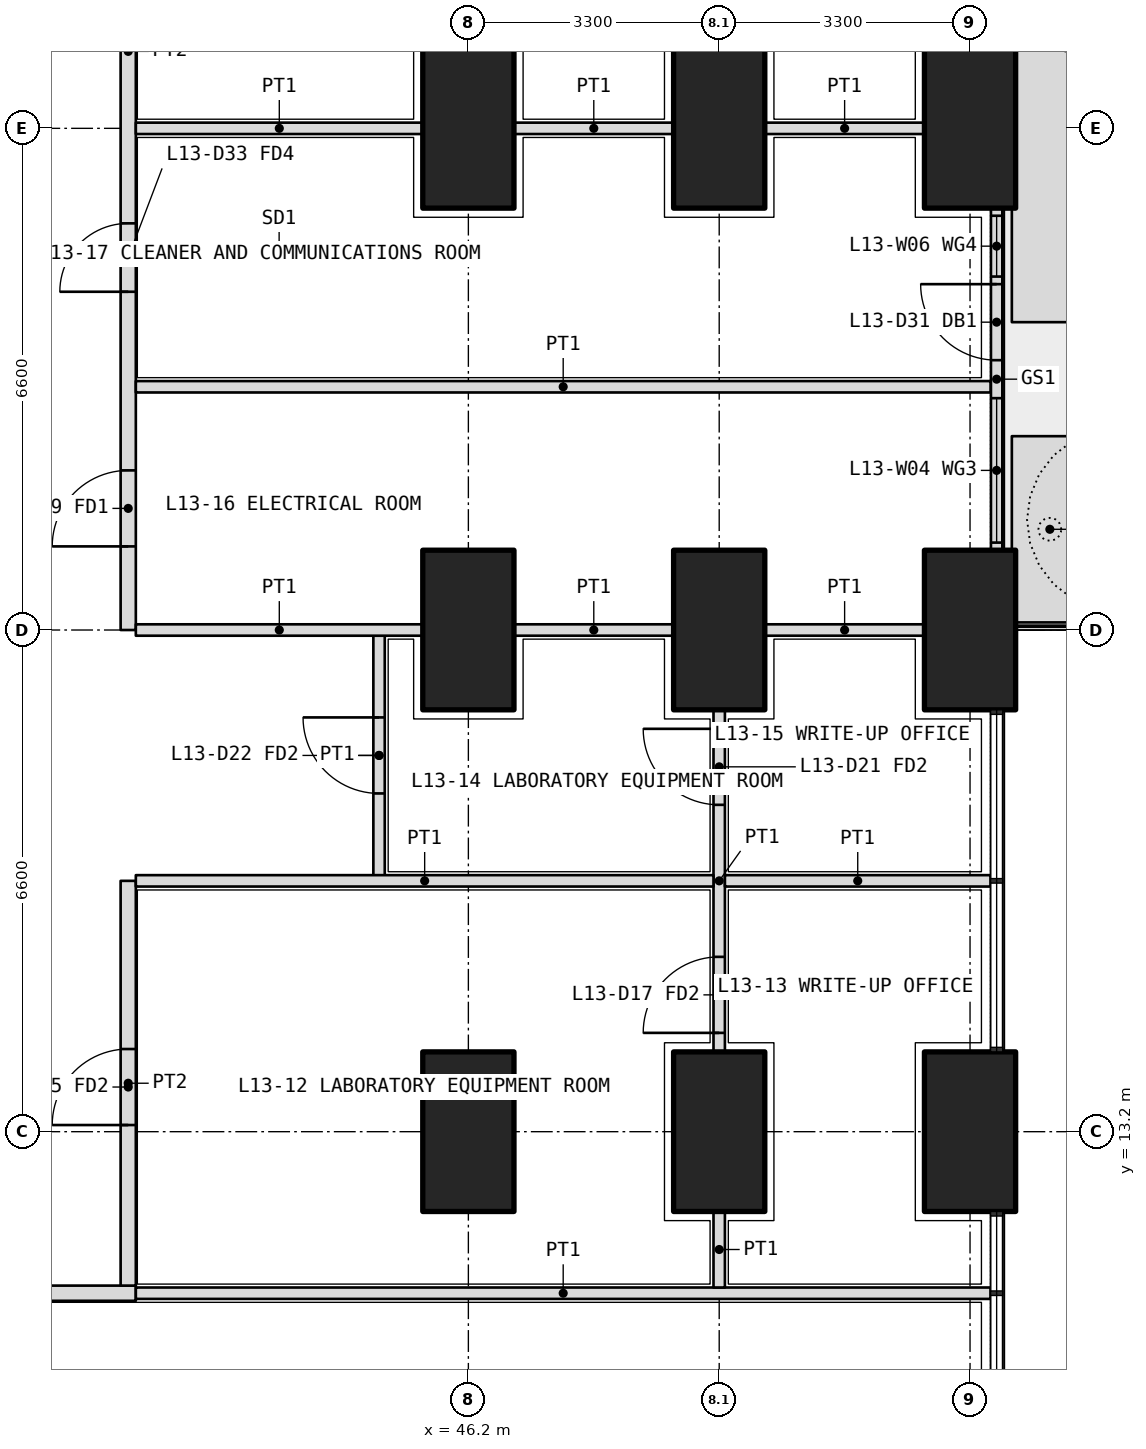
"""IFC4 building model, lengths in metres.
Left out: names, types, materials, properties, quantities, classifications, styles, units other than length and angle.
Written with IfcOpenShell. Run it as: python <this file> out.ifc"""

import sys

from ifc_helpers import new_model, si_unit, direction, frame, frame_2d, origin, origin_2d, place, context, subcontext, project, spatial, polyline, rectangle, outline, extrude, element, fill, save


model = new_model("IFC4")
c1 = context("Model", 3, precision=1e-05, world=origin(), true_north=direction((0.0, 1.0)))
c2 = subcontext(c1, "Body", "Model", "MODEL_VIEW")
j1 = project(units=[si_unit("LENGTHUNIT", "METRE"), si_unit("PLANEANGLEUNIT", "RADIAN")], contexts=[c1])
p1 = place(None, origin())
s1 = spatial("IfcSite", under=j1, at=p1, CompositionType="ELEMENT")
p2 = place(p1, origin())
s2 = spatial("IfcBuilding", under=s1, at=p2, CompositionType="ELEMENT")
p3 = place(p2, frame((0.0, 0.0, 59.1)))
s3 = spatial("IfcBuildingStorey", under=s2, at=p3, CompositionType="ELEMENT", Elevation=59.1)
for number, where, z_axis, x_axis in (
    (1, (52.8, 13.2, 0.0), (0.0, 0.0, 1.0), (0.0, 1.0, 0.0)),
    (2, (52.8, 19.8, 0.0), (0.0, 0.0, 1.0), (0.0, 1.0, 0.0)),
    (3, (52.8, 26.4, 0.0), (0.0, 0.0, 1.0), (0.0, 1.0, 0.0)),
    (4, (49.5, 13.2, 0.0), (0.0, 0.0, 1.0), (0.0, 1.0, 0.0)),
    (5, (49.5, 19.8, 0.0), (0.0, 0.0, 1.0), (0.0, 1.0, 0.0)),
    (6, (49.5, 26.4, 0.0), (0.0, 0.0, 1.0), (0.0, 1.0, 0.0)),
    (7, (46.2, 13.2, 0.0), (0.0, 0.0, 1.0), (0.0, 1.0, 0.0)),
    (8, (46.2, 19.8, 0.0), (0.0, 0.0, 1.0), (0.0, 1.0, 0.0)),
    (9, (46.2, 26.4, 0.0), (0.0, 0.0, 1.0), (0.0, 1.0, 0.0)),
):
    element("IfcColumn", number, at=place(p3, frame(where, z_axis=z_axis, x_axis=x_axis)), inside=s3, PredefinedType="COLUMN", context=c2, shape_type="SweptSolid", body=[
        extrude(rectangle(XDim=2.1, YDim=1.2, at=origin_2d()), origin(), (0.0, 0.0, 1.0), 4.2),
    ])
p4 = place(p3, origin())
e10 = element("IfcWall", 10, at=p4, inside=s3, PredefinedType="USERDEFINED", context=c2, shape_type="SweptSolid", body=[
    extrude(outline(polyline([(53.35, 19.9), (54.35, 19.9), (54.35, 22.35), (53.35, 22.35), (53.35, 19.9)]), holes=[polyline([(53.5, 20.05), (54.2, 20.05), (54.2, 22.2), (53.5, 22.2), (53.5, 20.05)])]), origin(), (0.0, 0.0, 1.0), 1.05),
])
p5 = place(p3, origin())
e11 = element("IfcWall", 11, at=p5, inside=s3, PredefinedType="USERDEFINED", context=c2, shape_type="SweptSolid", body=[
    extrude(outline(polyline([(53.35, 23.85), (54.35, 23.85), (54.35, 32.9), (53.35, 32.9), (53.35, 23.85)]), holes=[polyline([(53.5, 24.0), (54.2, 24.0), (54.2, 32.75), (53.5, 32.75), (53.5, 24.0)])]), origin(), (0.0, 0.0, 1.0), 1.05),
])
p6 = place(p3, frame((53.15, 20.85, 0.0), z_axis=(0.0, 0.0, 1.0), x_axis=(0.0, 1.0, 0.0)))
e12 = element("IfcWall", 12, at=p6, inside=s3, PredefinedType="SOLIDWALL", context=c2, shape_type="SweptSolid", body=[
    extrude(rectangle(XDim=4.5, YDim=0.15, at=frame_2d((2.25, 0.0))), origin(), (0.0, 0.0, 1.0), 2.7),
])
p7 = place(p6, frame((2.5, 0.0, 0.0)))
e13 = element("IfcOpeningElement", 13, at=p7, cuts=e12, PredefinedType="OPENING", context=c2, shape_type="SweptSolid", body=[
    extrude(rectangle(XDim=1.0, YDim=2.4, at=frame_2d((0.5, 1.2))), frame((0.0, 0.085, 0.0), z_axis=(0.0, -1.0, 0.0), x_axis=(1.0, 0.0, 0.0)), (0.0, 0.0, 1.0), 0.17),
])
p8 = place(p6, frame((0.1, 0.0, 0.1)))
e14 = element("IfcOpeningElement", 14, at=p8, cuts=e12, PredefinedType="OPENING", context=c2, shape_type="SweptSolid", body=[
    extrude(rectangle(XDim=1.9, YDim=2.3, at=frame_2d((0.95, 1.15))), frame((0.0, 0.085, 0.0), z_axis=(0.0, -1.0, 0.0), x_axis=(1.0, 0.0, 0.0)), (0.0, 0.0, 1.0), 0.17),
])
p9 = place(p6, frame((3.6, 0.0, 0.1)))
e15 = element("IfcOpeningElement", 15, at=p9, cuts=e12, PredefinedType="OPENING", context=c2, shape_type="SweptSolid", body=[
    extrude(rectangle(XDim=0.8, YDim=2.3, at=frame_2d((0.4, 1.15))), frame((0.0, 0.085, 0.0), z_axis=(0.0, -1.0, 0.0), x_axis=(1.0, 0.0, 0.0)), (0.0, 0.0, 1.0), 0.17),
])
p10 = place(p3, frame((10.975, 11.075, 0.0), z_axis=(0.0, 0.0, 1.0), x_axis=(1.0, 0.0, 0.0)))
e16 = element("IfcWall", 16, at=p10, inside=s3, PredefinedType="PARTITIONING", context=c2, shape_type="SweptSolid", body=[
    extrude(rectangle(XDim=30.85, YDim=0.2, at=frame_2d((15.425, 0.0))), origin(), (0.0, 0.0, 1.0), 2.85),
])
p11 = place(p10, frame((0.663, 0.0, 0.0)))
e17 = element("IfcOpeningElement", 17, at=p11, cuts=e16, PredefinedType="OPENING", context=c2, shape_type="SweptSolid", body=[
    extrude(rectangle(XDim=1.0, YDim=2.1, at=frame_2d((0.5, 1.05))), frame((0.0, 0.11, 0.0), z_axis=(0.0, -1.0, 0.0), x_axis=(1.0, 0.0, 0.0)), (0.0, 0.0, 1.0), 0.22),
])
p12 = place(p10, frame((3.275, 0.0, 0.0)))
e18 = element("IfcOpeningElement", 18, at=p12, cuts=e16, PredefinedType="OPENING", context=c2, shape_type="SweptSolid", body=[
    extrude(rectangle(XDim=1.2, YDim=2.1, at=frame_2d((0.6, 1.05))), frame((0.0, 0.11, 0.0), z_axis=(0.0, -1.0, 0.0), x_axis=(1.0, 0.0, 0.0)), (0.0, 0.0, 1.0), 0.22),
])
p13 = place(p10, frame((6.775, 0.0, 0.0)))
e19 = element("IfcOpeningElement", 19, at=p13, cuts=e16, PredefinedType="OPENING", context=c2, shape_type="SweptSolid", body=[
    extrude(rectangle(XDim=1.0, YDim=2.1, at=frame_2d((0.5, 1.05))), frame((0.0, 0.11, 0.0), z_axis=(0.0, -1.0, 0.0), x_axis=(1.0, 0.0, 0.0)), (0.0, 0.0, 1.0), 0.22),
])
p14 = place(p10, frame((10.075, 0.0, 0.0)))
e20 = element("IfcOpeningElement", 20, at=p14, cuts=e16, PredefinedType="OPENING", context=c2, shape_type="SweptSolid", body=[
    extrude(rectangle(XDim=1.0, YDim=2.1, at=frame_2d((0.5, 1.05))), frame((0.0, 0.11, 0.0), z_axis=(0.0, -1.0, 0.0), x_axis=(1.0, 0.0, 0.0)), (0.0, 0.0, 1.0), 0.22),
])
p15 = place(p10, frame((14.825, 0.0, 0.0)))
e21 = element("IfcOpeningElement", 21, at=p15, cuts=e16, PredefinedType="OPENING", context=c2, shape_type="SweptSolid", body=[
    extrude(rectangle(XDim=1.2, YDim=2.1, at=frame_2d((0.6, 1.05))), frame((0.0, 0.11, 0.0), z_axis=(0.0, -1.0, 0.0), x_axis=(1.0, 0.0, 0.0)), (0.0, 0.0, 1.0), 0.22),
])
p16 = place(p10, frame((19.875, 0.0, 0.0)))
e22 = element("IfcOpeningElement", 22, at=p16, cuts=e16, PredefinedType="OPENING", context=c2, shape_type="SweptSolid", body=[
    extrude(rectangle(XDim=1.0, YDim=2.1, at=frame_2d((0.5, 1.05))), frame((0.0, 0.11, 0.0), z_axis=(0.0, -1.0, 0.0), x_axis=(1.0, 0.0, 0.0)), (0.0, 0.0, 1.0), 0.22),
])
p17 = place(p10, frame((25.887, 0.0, 0.0)))
e23 = element("IfcOpeningElement", 23, at=p17, cuts=e16, PredefinedType="OPENING", context=c2, shape_type="SweptSolid", body=[
    extrude(rectangle(XDim=1.0, YDim=2.1, at=frame_2d((0.5, 1.05))), frame((0.0, 0.11, 0.0), z_axis=(0.0, -1.0, 0.0), x_axis=(1.0, 0.0, 0.0)), (0.0, 0.0, 1.0), 0.22),
])
p18 = place(p3, frame((41.725, 11.175, 0.0), z_axis=(0.0, 0.0, 1.0), x_axis=(0.0, 1.0, 0.0)))
e24 = element("IfcWall", 24, at=p18, inside=s3, PredefinedType="PARTITIONING", context=c2, shape_type="SweptSolid", body=[
    extrude(rectangle(XDim=5.325, YDim=0.2, at=frame_2d((2.663, 0.0))), origin(), (0.0, 0.0, 1.0), 2.85),
])
p19 = place(p18, frame((2.113, 0.0, 0.0)))
e25 = element("IfcOpeningElement", 25, at=p19, cuts=e24, PredefinedType="OPENING", context=c2, shape_type="SweptSolid", body=[
    extrude(rectangle(XDim=1.0, YDim=2.1, at=frame_2d((0.5, 1.05))), frame((0.0, 0.11, 0.0), z_axis=(0.0, -1.0, 0.0), x_axis=(1.0, 0.0, 0.0)), (0.0, 0.0, 1.0), 0.22),
])
p20 = place(p3, frame((41.725, 19.8, 0.0), z_axis=(0.0, 0.0, 1.0), x_axis=(0.0, 1.0, 0.0)))
e26 = element("IfcWall", 26, at=p20, inside=s3, PredefinedType="PARTITIONING", context=c2, shape_type="SweptSolid", body=[
    extrude(rectangle(XDim=15.225, YDim=0.2, at=frame_2d((7.612, 0.0))), origin(), (0.0, 0.0, 1.0), 2.85),
])
p21 = place(p20, frame((1.1, 0.0, 0.0)))
e27 = element("IfcOpeningElement", 27, at=p21, cuts=e26, PredefinedType="OPENING", context=c2, shape_type="SweptSolid", body=[
    extrude(rectangle(XDim=1.0, YDim=2.1, at=frame_2d((0.5, 1.05))), frame((0.0, 0.11, 0.0), z_axis=(0.0, -1.0, 0.0), x_axis=(1.0, 0.0, 0.0)), (0.0, 0.0, 1.0), 0.22),
])
p22 = place(p20, frame((4.45, 0.0, 0.0)))
e28 = element("IfcOpeningElement", 28, at=p22, cuts=e26, PredefinedType="OPENING", context=c2, shape_type="SweptSolid", body=[
    extrude(rectangle(XDim=0.9, YDim=2.1, at=frame_2d((0.45, 1.05))), frame((0.0, 0.11, 0.0), z_axis=(0.0, -1.0, 0.0), x_axis=(1.0, 0.0, 0.0)), (0.0, 0.0, 1.0), 0.22),
])
p23 = place(p20, frame((9.3, 0.0, 0.0)))
e29 = element("IfcOpeningElement", 29, at=p23, cuts=e26, PredefinedType="OPENING", context=c2, shape_type="SweptSolid", body=[
    extrude(rectangle(XDim=1.2, YDim=2.1, at=frame_2d((0.6, 1.05))), frame((0.0, 0.11, 0.0), z_axis=(0.0, -1.0, 0.0), x_axis=(1.0, 0.0, 0.0)), (0.0, 0.0, 1.0), 0.22),
])
p24 = place(p20, frame((13.762, 0.0, 0.0)))
e30 = element("IfcOpeningElement", 30, at=p24, cuts=e26, PredefinedType="OPENING", context=c2, shape_type="SweptSolid", body=[
    extrude(rectangle(XDim=1.0, YDim=2.1, at=frame_2d((0.5, 1.05))), frame((0.0, 0.11, 0.0), z_axis=(0.0, -1.0, 0.0), x_axis=(1.0, 0.0, 0.0)), (0.0, 0.0, 1.0), 0.22),
])
p25 = place(p3, frame((53.07, 11.075, 0.0), z_axis=(0.0, 0.0, 1.0), x_axis=(-1.0, 0.0, 0.0)))
e31 = element("IfcWall", 31, at=p25, inside=s3, PredefinedType="PARTITIONING", context=c2, shape_type="SweptSolid", body=[
    extrude(rectangle(XDim=11.245, YDim=0.15, at=frame_2d((5.623, 0.0))), origin(), (0.0, 0.0, 1.0), 2.7),
])
p26 = place(p3, frame((49.5, 11.15, 0.0), z_axis=(0.0, 0.0, 1.0), x_axis=(0.0, 1.0, 0.0)))
e32 = element("IfcWall", 32, at=p26, inside=s3, PredefinedType="PARTITIONING", context=c2, shape_type="SweptSolid", body=[
    extrude(rectangle(XDim=1.0, YDim=0.15, at=frame_2d((0.5, 0.0))), origin(), (0.0, 0.0, 1.0), 3.9),
])
p27 = place(p3, frame((49.5, 14.25, 0.0), z_axis=(0.0, 0.0, 1.0), x_axis=(0.0, 1.0, 0.0)))
e33 = element("IfcWall", 33, at=p27, inside=s3, PredefinedType="PARTITIONING", context=c2, shape_type="SweptSolid", body=[
    extrude(rectangle(XDim=4.5, YDim=0.15, at=frame_2d((2.25, 0.0))), origin(), (0.0, 0.0, 1.0), 3.9),
])
p28 = place(p27, frame((0.25, 0.0, 0.0)))
e34 = element("IfcOpeningElement", 34, at=p28, cuts=e33, PredefinedType="OPENING", context=c2, shape_type="SweptSolid", body=[
    extrude(rectangle(XDim=1.0, YDim=2.1, at=frame_2d((0.5, 1.05))), frame((0.0, 0.085, 0.0), z_axis=(0.0, -1.0, 0.0), x_axis=(1.0, 0.0, 0.0)), (0.0, 0.0, 1.0), 0.17),
])
p29 = place(p27, frame((3.25, 0.0, 0.0)))
e35 = element("IfcOpeningElement", 35, at=p29, cuts=e33, PredefinedType="OPENING", context=c2, shape_type="SweptSolid", body=[
    extrude(rectangle(XDim=1.0, YDim=2.1, at=frame_2d((0.5, 1.05))), frame((0.0, 0.085, 0.0), z_axis=(0.0, -1.0, 0.0), x_axis=(1.0, 0.0, 0.0)), (0.0, 0.0, 1.0), 0.17),
])
p30 = place(p3, frame((45.025, 16.5, 0.0), z_axis=(0.0, 0.0, 1.0), x_axis=(0.0, 1.0, 0.0)))
e36 = element("IfcWall", 36, at=p30, inside=s3, PredefinedType="PARTITIONING", context=c2, shape_type="SweptSolid", body=[
    extrude(rectangle(XDim=3.3, YDim=0.15, at=frame_2d((1.65, 0.0))), origin(), (0.0, 0.0, 1.0), 2.85),
])
p31 = place(p30, frame((1.15, 0.0, 0.0)))
e37 = element("IfcOpeningElement", 37, at=p31, cuts=e36, PredefinedType="OPENING", context=c2, shape_type="SweptSolid", body=[
    extrude(rectangle(XDim=1.0, YDim=2.1, at=frame_2d((0.5, 1.05))), frame((0.0, 0.085, 0.0), z_axis=(0.0, -1.0, 0.0), x_axis=(1.0, 0.0, 0.0)), (0.0, 0.0, 1.0), 0.17),
])
p32 = place(p3, frame((53.07, 23.0, 0.0), z_axis=(0.0, 0.0, 1.0), x_axis=(-1.0, 0.0, 0.0)))
e38 = element("IfcWall", 38, at=p32, inside=s3, PredefinedType="PARTITIONING", context=c2, shape_type="SweptSolid", body=[
    extrude(rectangle(XDim=11.245, YDim=0.15, at=frame_2d((5.623, 0.0))), origin(), (0.0, 0.0, 1.0), 2.7),
])
for number, where, z_axis, x_axis in (
    (39, (52.2, 26.4, 0.0), (0.0, 0.0, 1.0), (-1.0, 0.0, 0.0)),
    (40, (48.9, 26.4, 0.0), (0.0, 0.0, 1.0), (-1.0, 0.0, 0.0)),
):
    element("IfcWall", number, at=place(p3, frame(where, z_axis=z_axis, x_axis=x_axis)), inside=s3, PredefinedType="PARTITIONING", context=c2, shape_type="SweptSolid", body=[
        extrude(rectangle(XDim=2.1, YDim=0.15, at=frame_2d((1.05, 0.0))), origin(), (0.0, 0.0, 1.0), 2.85),
    ])
p33 = place(p3, frame((45.6, 26.4, 0.0), z_axis=(0.0, 0.0, 1.0), x_axis=(-1.0, 0.0, 0.0)))
e41 = element("IfcWall", 41, at=p33, inside=s3, PredefinedType="PARTITIONING", context=c2, shape_type="SweptSolid", body=[
    extrude(rectangle(XDim=3.775, YDim=0.15, at=frame_2d((1.888, 0.0))), origin(), (0.0, 0.0, 1.0), 2.85),
])
p34 = place(p3, frame((53.07, 16.5, 0.0), z_axis=(0.0, 0.0, 1.0), x_axis=(-1.0, 0.0, 0.0)))
e42 = element("IfcWall", 42, at=p34, inside=s3, PredefinedType="PARTITIONING", context=c2, shape_type="SweptSolid", body=[
    extrude(rectangle(XDim=3.495, YDim=0.15, at=frame_2d((1.748, 0.0))), origin(), (0.0, 0.0, 1.0), 2.7),
])
p35 = place(p3, frame((49.425, 16.5, 0.0), z_axis=(0.0, 0.0, 1.0), x_axis=(-1.0, 0.0, 0.0)))
e43 = element("IfcWall", 43, at=p35, inside=s3, PredefinedType="PARTITIONING", context=c2, shape_type="SweptSolid", body=[
    extrude(rectangle(XDim=7.6, YDim=0.15, at=frame_2d((3.8, 0.0))), origin(), (0.0, 0.0, 1.0), 3.9),
])
for number, where, z_axis, x_axis in (
    (44, (52.2, 19.8, 0.0), (0.0, 0.0, 1.0), (-1.0, 0.0, 0.0)),
    (45, (48.9, 19.8, 0.0), (0.0, 0.0, 1.0), (-1.0, 0.0, 0.0)),
):
    element("IfcWall", number, at=place(p3, frame(where, z_axis=z_axis, x_axis=x_axis)), inside=s3, PredefinedType="PARTITIONING", context=c2, shape_type="SweptSolid", body=[
        extrude(rectangle(XDim=2.1, YDim=0.15, at=frame_2d((1.05, 0.0))), origin(), (0.0, 0.0, 1.0), 2.85),
    ])
p36 = place(p3, frame((45.6, 19.8, 0.0), z_axis=(0.0, 0.0, 1.0), x_axis=(-1.0, 0.0, 0.0)))
e46 = element("IfcWall", 46, at=p36, inside=s3, PredefinedType="PARTITIONING", context=c2, shape_type="SweptSolid", body=[
    extrude(rectangle(XDim=3.775, YDim=0.15, at=frame_2d((1.888, 0.0))), origin(), (0.0, 0.0, 1.0), 2.85),
])
p37 = place(p7, origin())
e47 = element("IfcDoor", 47, at=p37, inside=s3, OperationType="SINGLE_SWING_RIGHT", PredefinedType="DOOR", context=c2, shape_type="SweptSolid", body=[
    extrude(rectangle(XDim=1.0, YDim=2.4, at=frame_2d((0.5, 1.2))), frame((0.0, 0.025, 0.0), z_axis=(0.0, -1.0, 0.0), x_axis=(1.0, 0.0, 0.0)), (0.0, 0.0, 1.0), 0.05),
])
fill(e13, e47)
p38 = place(p8, origin())
e48 = element("IfcWindow", 48, at=p38, inside=s3, PartitioningType="SINGLE_PANEL", PredefinedType="WINDOW", context=c2, shape_type="SweptSolid", body=[
    extrude(rectangle(XDim=1.9, YDim=2.3, at=frame_2d((0.95, 1.15))), frame((0.0, 0.03, 0.0), z_axis=(0.0, -1.0, 0.0), x_axis=(1.0, 0.0, 0.0)), (0.0, 0.0, 1.0), 0.06),
])
fill(e14, e48)
p39 = place(p9, origin())
e49 = element("IfcWindow", 49, at=p39, inside=s3, PartitioningType="SINGLE_PANEL", PredefinedType="WINDOW", context=c2, shape_type="SweptSolid", body=[
    extrude(rectangle(XDim=0.8, YDim=2.3, at=frame_2d((0.4, 1.15))), frame((0.0, 0.03, 0.0), z_axis=(0.0, -1.0, 0.0), x_axis=(1.0, 0.0, 0.0)), (0.0, 0.0, 1.0), 0.06),
])
fill(e15, e49)
p40 = place(p19, origin())
e50 = element("IfcDoor", 50, at=p40, inside=s3, OperationType="SINGLE_SWING_LEFT", PredefinedType="DOOR", context=c2, shape_type="SweptSolid", body=[
    extrude(rectangle(XDim=1.0, YDim=2.1, at=frame_2d((0.5, 1.05))), frame((0.0, 0.025, 0.0), z_axis=(0.0, -1.0, 0.0), x_axis=(1.0, 0.0, 0.0)), (0.0, 0.0, 1.0), 0.05),
])
fill(e25, e50)
p41 = place(p28, origin())
e51 = element("IfcDoor", 51, at=p41, inside=s3, OperationType="SINGLE_SWING_LEFT", PredefinedType="DOOR", context=c2, shape_type="SweptSolid", body=[
    extrude(rectangle(XDim=1.0, YDim=2.1, at=frame_2d((0.5, 1.05))), frame((0.0, 0.025, 0.0), z_axis=(0.0, -1.0, 0.0), x_axis=(1.0, 0.0, 0.0)), (0.0, 0.0, 1.0), 0.05),
])
fill(e34, e51)
p42 = place(p31, origin())
e52 = element("IfcDoor", 52, at=p42, inside=s3, OperationType="SINGLE_SWING_RIGHT", PredefinedType="DOOR", context=c2, shape_type="SweptSolid", body=[
    extrude(rectangle(XDim=1.0, YDim=2.1, at=frame_2d((0.5, 1.05))), frame((0.0, 0.025, 0.0), z_axis=(0.0, -1.0, 0.0), x_axis=(1.0, 0.0, 0.0)), (0.0, 0.0, 1.0), 0.05),
])
fill(e37, e52)
p43 = place(p29, origin())
e53 = element("IfcDoor", 53, at=p43, inside=s3, OperationType="SINGLE_SWING_RIGHT", PredefinedType="DOOR", context=c2, shape_type="SweptSolid", body=[
    extrude(rectangle(XDim=1.0, YDim=2.1, at=frame_2d((0.5, 1.05))), frame((0.0, 0.025, 0.0), z_axis=(0.0, -1.0, 0.0), x_axis=(1.0, 0.0, 0.0)), (0.0, 0.0, 1.0), 0.05),
])
fill(e35, e53)
p44 = place(p21, origin())
e54 = element("IfcDoor", 54, at=p44, inside=s3, OperationType="SINGLE_SWING_LEFT", PredefinedType="DOOR", context=c2, shape_type="SweptSolid", body=[
    extrude(rectangle(XDim=1.0, YDim=2.1, at=frame_2d((0.5, 1.05))), frame((0.0, 0.025, 0.0), z_axis=(0.0, -1.0, 0.0), x_axis=(1.0, 0.0, 0.0)), (0.0, 0.0, 1.0), 0.05),
])
fill(e27, e54)
p45 = place(p22, origin())
e55 = element("IfcDoor", 55, at=p45, inside=s3, OperationType="SINGLE_SWING_LEFT", PredefinedType="DOOR", context=c2, shape_type="SweptSolid", body=[
    extrude(rectangle(XDim=0.9, YDim=2.1, at=frame_2d((0.45, 1.05))), frame((0.0, 0.025, 0.0), z_axis=(0.0, -1.0, 0.0), x_axis=(1.0, 0.0, 0.0)), (0.0, 0.0, 1.0), 0.05),
])
fill(e28, e55)
save(model, sys.argv[1])
